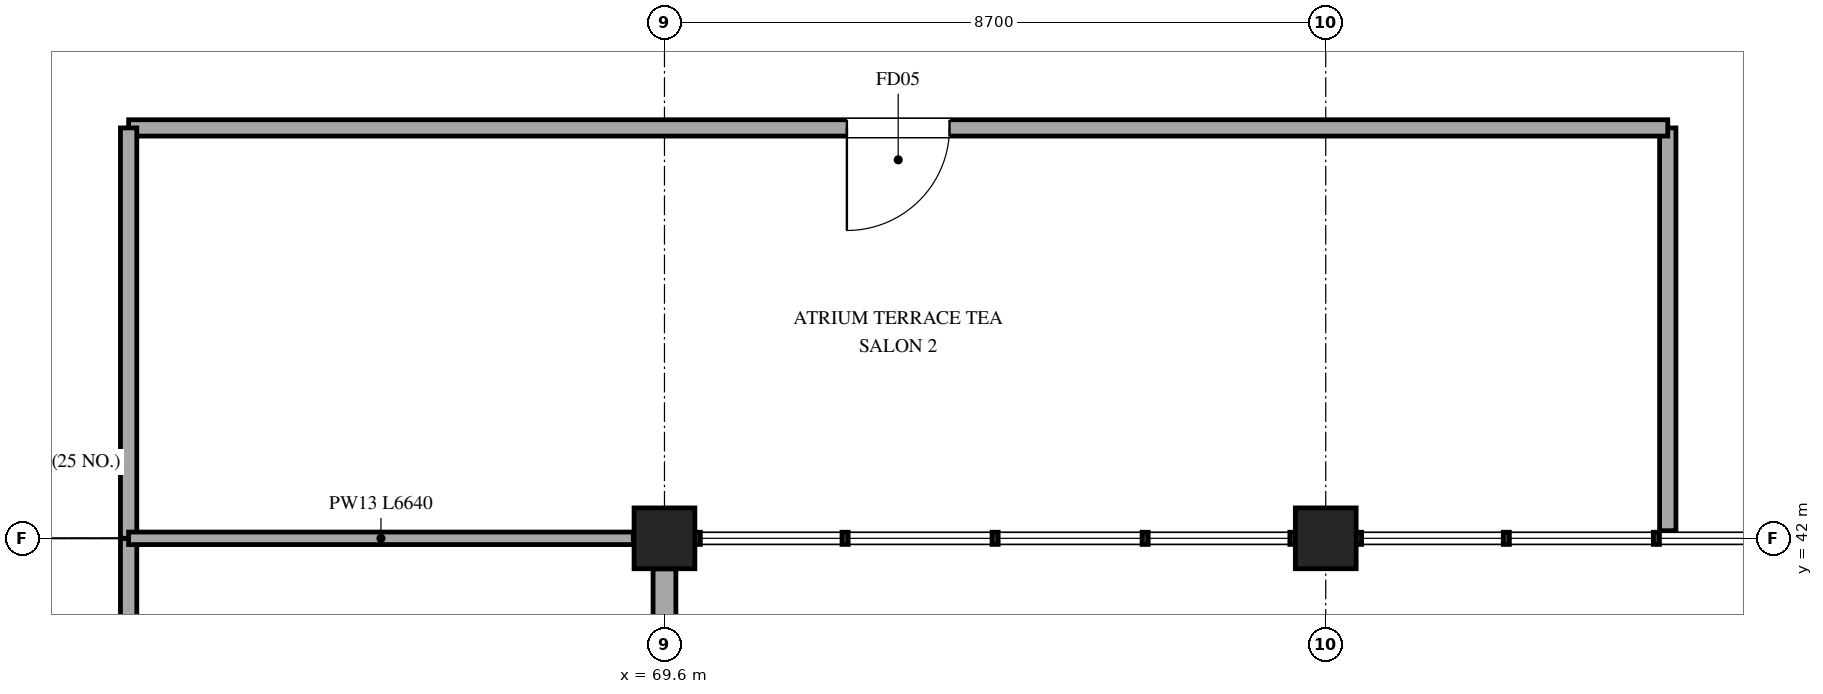
"""IFC4 building model, lengths in metres.
Left out: names, types, materials, properties, quantities, classifications, styles, units other than length and angle.
Written with IfcOpenShell. Run it as: python <this file> out.ifc"""

import sys

from ifc_helpers import new_model, si_unit, direction, frame, frame_2d, origin, origin_2d, place, context, subcontext, project, spatial, rectangle, extrude, element, fill, save


model = new_model("IFC4")
c1 = context("Model", 3, precision=1e-05, world=origin(), true_north=direction((0.0, 1.0)))
c2 = subcontext(c1, "Body", "Model", "MODEL_VIEW")
j1 = project(units=[si_unit("LENGTHUNIT", "METRE"), si_unit("PLANEANGLEUNIT", "RADIAN")], contexts=[c1])
p1 = place(None, origin())
s1 = spatial("IfcSite", under=j1, at=p1, CompositionType="ELEMENT")
p2 = place(p1, origin())
s2 = spatial("IfcBuilding", under=s1, at=p2, CompositionType="ELEMENT")
p3 = place(p2, frame((0.0, 0.0, 21.6)))
s3 = spatial("IfcBuildingStorey", under=s2, at=p3, CompositionType="ELEMENT", Elevation=21.6)
for number, where, z_axis, x_axis in (
    (1, (69.6, 42.0, 0.0), (0.0, 0.0, 1.0), (1.0, 0.0, 0.0)),
    (2, (78.3, 42.0, 0.0), (0.0, 0.0, 1.0), (1.0, 0.0, 0.0)),
):
    element("IfcColumn", number, at=place(p3, frame(where, z_axis=z_axis, x_axis=x_axis)), inside=s3, PredefinedType="COLUMN", context=c2, shape_type="SweptSolid", body=[
        extrude(rectangle(XDim=0.8, YDim=0.8, at=origin_2d()), origin(), (0.0, 0.0, 1.0), 5.1),
    ])
p4 = place(p3, frame((69.6, 41.598, 0.0), z_axis=(0.0, 0.0, 1.0), x_axis=(0.0, -1.0, 0.0)))
e3 = element("IfcWall", 3, at=p4, inside=s3, PredefinedType="STANDARD", context=c2, shape_type="SweptSolid", body=[
    extrude(rectangle(XDim=7.596, YDim=0.3, at=frame_2d((3.798, 0.0))), origin(), (0.0, 0.0, 1.0), 4.255),
])
p5 = place(p4, frame((0.745, 0.0, 0.85)))
e4 = element("IfcOpeningElement", 4, at=p5, cuts=e3, PredefinedType="OPENING", context=c2, shape_type="SweptSolid", body=[
    extrude(rectangle(XDim=1.8, YDim=1.6, at=frame_2d((0.9, 0.8))), frame((0.0, 0.16, 0.0), z_axis=(0.0, -1.0, 0.0), x_axis=(1.0, 0.0, 0.0)), (0.0, 0.0, 1.0), 0.32),
])
p6 = place(p3, frame((62.55, 42.0, 0.0), z_axis=(0.0, 0.0, 1.0), x_axis=(0.0, -1.0, 0.0)))
e5 = element("IfcWall", 5, at=p6, inside=s3, PredefinedType="PARTITIONING", context=c2, shape_type="SweptSolid", body=[
    extrude(rectangle(XDim=4.0, YDim=0.215, at=frame_2d((2.0, 0.0))), origin(), (0.0, 0.0, 1.0), 4.06),
])
p7 = place(p6, frame((1.325, 0.0, 0.0)))
e6 = element("IfcOpeningElement", 6, at=p7, cuts=e5, PredefinedType="OPENING", context=c2, shape_type="SweptSolid", body=[
    extrude(rectangle(XDim=1.35, YDim=2.2, at=frame_2d((0.675, 1.1))), frame((0.0, 0.118, 0.0), z_axis=(0.0, -1.0, 0.0), x_axis=(1.0, 0.0, 0.0)), (0.0, 0.0, 1.0), 0.235),
])
p8 = place(p3, frame((82.8, 42.1, 0.0), z_axis=(0.0, 0.0, 1.0), x_axis=(0.0, 1.0, 0.0)))
e7 = element("IfcWall", 7, at=p8, inside=s3, PredefinedType="PARTITIONING", context=c2, shape_type="SweptSolid", body=[
    extrude(rectangle(XDim=5.3, YDim=0.215, at=frame_2d((2.65, 0.0))), origin(), (0.0, 0.0, 1.0), 4.26),
])
p9 = place(p3, frame((82.8, 47.4, 0.0), z_axis=(0.0, 0.0, 1.0), x_axis=(-1.0, 0.0, 0.0)))
e8 = element("IfcWall", 8, at=p9, inside=s3, PredefinedType="PARTITIONING", context=c2, shape_type="SweptSolid", body=[
    extrude(rectangle(XDim=20.25, YDim=0.215, at=frame_2d((10.125, 0.0))), origin(), (0.0, 0.0, 1.0), 4.06),
])
p10 = place(p9, frame((9.45, 0.0, 0.0)))
e9 = element("IfcOpeningElement", 9, at=p10, cuts=e8, PredefinedType="OPENING", context=c2, shape_type="SweptSolid", body=[
    extrude(rectangle(XDim=1.35, YDim=2.2, at=frame_2d((0.675, 1.1))), frame((0.0, 0.118, 0.0), z_axis=(0.0, -1.0, 0.0), x_axis=(1.0, 0.0, 0.0)), (0.0, 0.0, 1.0), 0.235),
])
p11 = place(p3, frame((62.55, 47.4, 0.0), z_axis=(0.0, 0.0, 1.0), x_axis=(0.0, -1.0, 0.0)))
e10 = element("IfcWall", 10, at=p11, inside=s3, PredefinedType="PARTITIONING", context=c2, shape_type="SweptSolid", body=[
    extrude(rectangle(XDim=5.4, YDim=0.215, at=frame_2d((2.7, 0.0))), origin(), (0.0, 0.0, 1.0), 4.06),
])
p12 = place(p3, frame((62.55, 42.0, 0.0), z_axis=(0.0, 0.0, 1.0), x_axis=(1.0, 0.0, 0.0)))
e11 = element("IfcWall", 11, at=p12, inside=s3, PredefinedType="PARTITIONING", context=c2, shape_type="SweptSolid", body=[
    extrude(rectangle(XDim=6.64, YDim=0.165, at=frame_2d((3.32, 0.0))), origin(), (0.0, 0.0, 1.0), 4.06),
])
p13 = place(p10, origin())
e12 = element("IfcDoor", 12, at=p13, inside=s3, OperationType="SINGLE_SWING_RIGHT", PredefinedType="DOOR", context=c2, shape_type="SweptSolid", body=[
    extrude(rectangle(XDim=1.35, YDim=2.2, at=frame_2d((0.675, 1.1))), frame((0.0, 0.025, 0.0), z_axis=(0.0, -1.0, 0.0), x_axis=(1.0, 0.0, 0.0)), (0.0, 0.0, 1.0), 0.05),
])
fill(e9, e12)
save(model, sys.argv[1])
